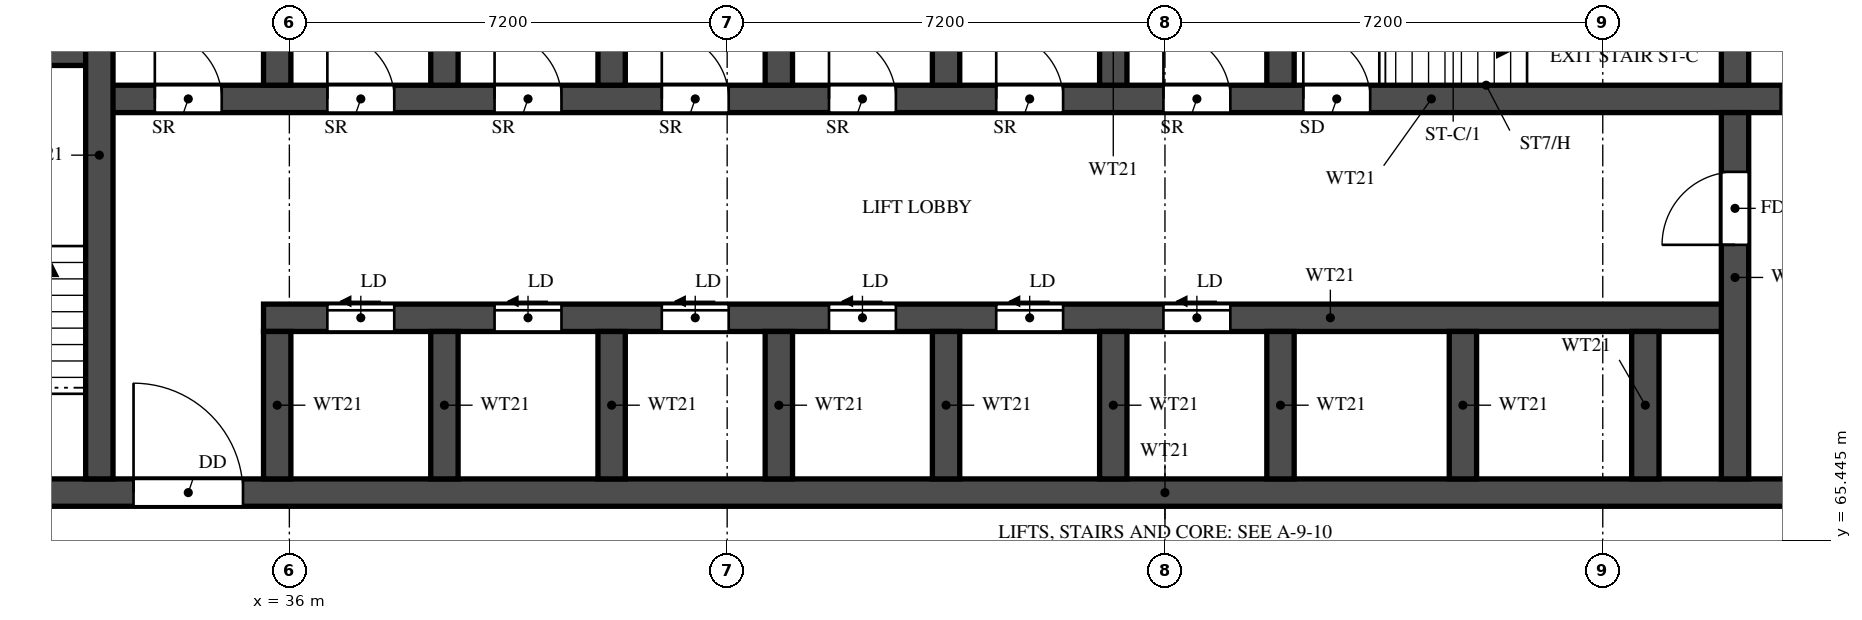
"""IFC4 building model, lengths in metres.
Left out: names, types, materials, properties, quantities, classifications, styles, units other than length and angle.
Written with IfcOpenShell. Run it as: python <this file> out.ifc"""

import sys

from ifc_helpers import new_model, si_unit, direction, frame, frame_2d, origin, place, context, subcontext, project, spatial, rectangle, extrude, element, fill, save


model = new_model("IFC4")
c1 = context("Model", 3, precision=1e-05, world=origin(), true_north=direction((0.0, 1.0)))
c2 = subcontext(c1, "Body", "Model", "MODEL_VIEW")
j1 = project(units=[si_unit("LENGTHUNIT", "METRE"), si_unit("PLANEANGLEUNIT", "RADIAN")], contexts=[c1])
p1 = place(None, origin())
s1 = spatial("IfcSite", under=j1, at=p1, CompositionType="ELEMENT")
p2 = place(p1, origin())
s2 = spatial("IfcBuilding", under=s1, at=p2, CompositionType="ELEMENT")
p3 = place(p2, frame((0.0, 0.0, 58.5)))
s3 = spatial("IfcBuildingStorey", under=s2, at=p3, CompositionType="ELEMENT", Elevation=58.5)
p4 = place(p3, frame((29.7, 66.225, 0.0), z_axis=(0.0, 0.0, 1.0), x_axis=(1.0, 0.0, 0.0)))
e1 = element("IfcWall", 1, at=p4, inside=s3, PredefinedType="SHEAR", context=c2, shape_type="SweptSolid", body=[
    extrude(rectangle(XDim=41.4, YDim=0.45, at=frame_2d((20.7, 0.0))), origin(), (0.0, 0.0, 1.0), 3.18),
])
p5 = place(p4, frame((0.925, 0.0, 0.0)))
e2 = element("IfcOpeningElement", 2, at=p5, cuts=e1, PredefinedType="OPENING", context=c2, shape_type="SweptSolid", body=[
    extrude(rectangle(XDim=1.1, YDim=2.1, at=frame_2d((0.55, 1.05))), frame((0.0, 0.235, 0.0), z_axis=(0.0, -1.0, 0.0), x_axis=(1.0, 0.0, 0.0)), (0.0, 0.0, 1.0), 0.47),
])
p6 = place(p4, frame((3.738, 0.0, 0.0)))
e3 = element("IfcOpeningElement", 3, at=p6, cuts=e1, PredefinedType="OPENING", context=c2, shape_type="SweptSolid", body=[
    extrude(rectangle(XDim=1.8, YDim=2.1, at=frame_2d((0.9, 1.05))), frame((0.0, 0.235, 0.0), z_axis=(0.0, -1.0, 0.0), x_axis=(1.0, 0.0, 0.0)), (0.0, 0.0, 1.0), 0.47),
])
p7 = place(p3, frame((35.575, 69.1, 0.0), z_axis=(0.0, 0.0, 1.0), x_axis=(1.0, 0.0, 0.0)))
e4 = element("IfcWall", 4, at=p7, inside=s3, PredefinedType="SHEAR", context=c2, shape_type="SweptSolid", body=[
    extrude(rectangle(XDim=24.2, YDim=0.45, at=frame_2d((12.1, 0.0))), origin(), (0.0, 0.0, 1.0), 3.18),
])
p8 = place(p7, frame((1.05, 0.0, 0.0)))
e5 = element("IfcOpeningElement", 5, at=p8, cuts=e4, PredefinedType="OPENING", context=c2, shape_type="SweptSolid", body=[
    extrude(rectangle(XDim=1.1, YDim=2.1, at=frame_2d((0.55, 1.05))), frame((0.0, 0.235, 0.0), z_axis=(0.0, -1.0, 0.0), x_axis=(1.0, 0.0, 0.0)), (0.0, 0.0, 1.0), 0.47),
])
p9 = place(p7, frame((3.8, 0.0, 0.0)))
e6 = element("IfcOpeningElement", 6, at=p9, cuts=e4, PredefinedType="OPENING", context=c2, shape_type="SweptSolid", body=[
    extrude(rectangle(XDim=1.1, YDim=2.1, at=frame_2d((0.55, 1.05))), frame((0.0, 0.235, 0.0), z_axis=(0.0, -1.0, 0.0), x_axis=(1.0, 0.0, 0.0)), (0.0, 0.0, 1.0), 0.47),
])
p10 = place(p7, frame((6.55, 0.0, 0.0)))
e7 = element("IfcOpeningElement", 7, at=p10, cuts=e4, PredefinedType="OPENING", context=c2, shape_type="SweptSolid", body=[
    extrude(rectangle(XDim=1.1, YDim=2.1, at=frame_2d((0.55, 1.05))), frame((0.0, 0.235, 0.0), z_axis=(0.0, -1.0, 0.0), x_axis=(1.0, 0.0, 0.0)), (0.0, 0.0, 1.0), 0.47),
])
p11 = place(p7, frame((9.3, 0.0, 0.0)))
e8 = element("IfcOpeningElement", 8, at=p11, cuts=e4, PredefinedType="OPENING", context=c2, shape_type="SweptSolid", body=[
    extrude(rectangle(XDim=1.1, YDim=2.1, at=frame_2d((0.55, 1.05))), frame((0.0, 0.235, 0.0), z_axis=(0.0, -1.0, 0.0), x_axis=(1.0, 0.0, 0.0)), (0.0, 0.0, 1.0), 0.47),
])
p12 = place(p7, frame((12.05, 0.0, 0.0)))
e9 = element("IfcOpeningElement", 9, at=p12, cuts=e4, PredefinedType="OPENING", context=c2, shape_type="SweptSolid", body=[
    extrude(rectangle(XDim=1.1, YDim=2.1, at=frame_2d((0.55, 1.05))), frame((0.0, 0.235, 0.0), z_axis=(0.0, -1.0, 0.0), x_axis=(1.0, 0.0, 0.0)), (0.0, 0.0, 1.0), 0.47),
])
p13 = place(p7, frame((14.8, 0.0, 0.0)))
e10 = element("IfcOpeningElement", 10, at=p13, cuts=e4, PredefinedType="OPENING", context=c2, shape_type="SweptSolid", body=[
    extrude(rectangle(XDim=1.1, YDim=2.1, at=frame_2d((0.55, 1.05))), frame((0.0, 0.235, 0.0), z_axis=(0.0, -1.0, 0.0), x_axis=(1.0, 0.0, 0.0)), (0.0, 0.0, 1.0), 0.47),
])
p14 = place(p3, frame((32.875, 72.7, 0.0), z_axis=(0.0, 0.0, 1.0), x_axis=(1.0, 0.0, 0.0)))
e11 = element("IfcWall", 11, at=p14, inside=s3, PredefinedType="SHEAR", context=c2, shape_type="SweptSolid", body=[
    extrude(rectangle(XDim=35.05, YDim=0.45, at=frame_2d((17.525, 0.0))), origin(), (0.0, 0.0, 1.0), 3.18),
])
p15 = place(p14, frame((19.8, 0.0, 0.0)))
e12 = element("IfcOpeningElement", 12, at=p15, cuts=e11, PredefinedType="OPENING", context=c2, shape_type="SweptSolid", body=[
    extrude(rectangle(XDim=1.1, YDim=2.1, at=frame_2d((0.55, 1.05))), frame((0.0, 0.235, 0.0), z_axis=(0.0, -1.0, 0.0), x_axis=(1.0, 0.0, 0.0)), (0.0, 0.0, 1.0), 0.47),
])
p16 = place(p14, frame((27.65, 0.0, 0.0)))
e13 = element("IfcOpeningElement", 13, at=p16, cuts=e11, PredefinedType="OPENING", context=c2, shape_type="SweptSolid", body=[
    extrude(rectangle(XDim=1.1, YDim=2.1, at=frame_2d((0.55, 1.05))), frame((0.0, 0.235, 0.0), z_axis=(0.0, -1.0, 0.0), x_axis=(1.0, 0.0, 0.0)), (0.0, 0.0, 1.0), 0.47),
])
p17 = place(p14, frame((30.25, 0.0, 0.0)))
e14 = element("IfcOpeningElement", 14, at=p17, cuts=e11, PredefinedType="OPENING", context=c2, shape_type="SweptSolid", body=[
    extrude(rectangle(XDim=1.1, YDim=2.1, at=frame_2d((0.55, 1.05))), frame((0.0, 0.235, 0.0), z_axis=(0.0, -1.0, 0.0), x_axis=(1.0, 0.0, 0.0)), (0.0, 0.0, 1.0), 0.47),
])
p18 = place(p14, frame((3.75, 0.0, 0.0)))
e15 = element("IfcOpeningElement", 15, at=p18, cuts=e11, PredefinedType="OPENING", context=c2, shape_type="SweptSolid", body=[
    extrude(rectangle(XDim=1.1, YDim=2.1, at=frame_2d((0.55, 1.05))), frame((0.0, 0.235, 0.0), z_axis=(0.0, -1.0, 0.0), x_axis=(1.0, 0.0, 0.0)), (0.0, 0.0, 1.0), 0.47),
])
p19 = place(p14, frame((6.5, 0.0, 0.0)))
e16 = element("IfcOpeningElement", 16, at=p19, cuts=e11, PredefinedType="OPENING", context=c2, shape_type="SweptSolid", body=[
    extrude(rectangle(XDim=1.1, YDim=2.1, at=frame_2d((0.55, 1.05))), frame((0.0, 0.235, 0.0), z_axis=(0.0, -1.0, 0.0), x_axis=(1.0, 0.0, 0.0)), (0.0, 0.0, 1.0), 0.47),
])
p20 = place(p14, frame((9.25, 0.0, 0.0)))
e17 = element("IfcOpeningElement", 17, at=p20, cuts=e11, PredefinedType="OPENING", context=c2, shape_type="SweptSolid", body=[
    extrude(rectangle(XDim=1.1, YDim=2.1, at=frame_2d((0.55, 1.05))), frame((0.0, 0.235, 0.0), z_axis=(0.0, -1.0, 0.0), x_axis=(1.0, 0.0, 0.0)), (0.0, 0.0, 1.0), 0.47),
])
p21 = place(p14, frame((12.0, 0.0, 0.0)))
e18 = element("IfcOpeningElement", 18, at=p21, cuts=e11, PredefinedType="OPENING", context=c2, shape_type="SweptSolid", body=[
    extrude(rectangle(XDim=1.1, YDim=2.1, at=frame_2d((0.55, 1.05))), frame((0.0, 0.235, 0.0), z_axis=(0.0, -1.0, 0.0), x_axis=(1.0, 0.0, 0.0)), (0.0, 0.0, 1.0), 0.47),
])
p22 = place(p14, frame((14.75, 0.0, 0.0)))
e19 = element("IfcOpeningElement", 19, at=p22, cuts=e11, PredefinedType="OPENING", context=c2, shape_type="SweptSolid", body=[
    extrude(rectangle(XDim=1.1, YDim=2.1, at=frame_2d((0.55, 1.05))), frame((0.0, 0.235, 0.0), z_axis=(0.0, -1.0, 0.0), x_axis=(1.0, 0.0, 0.0)), (0.0, 0.0, 1.0), 0.47),
])
p23 = place(p14, frame((17.5, 0.0, 0.0)))
e20 = element("IfcOpeningElement", 20, at=p23, cuts=e11, PredefinedType="OPENING", context=c2, shape_type="SweptSolid", body=[
    extrude(rectangle(XDim=1.1, YDim=2.1, at=frame_2d((0.55, 1.05))), frame((0.0, 0.235, 0.0), z_axis=(0.0, -1.0, 0.0), x_axis=(1.0, 0.0, 0.0)), (0.0, 0.0, 1.0), 0.47),
])
p24 = place(p14, frame((0.913, 0.0, 0.0)))
e21 = element("IfcOpeningElement", 21, at=p24, cuts=e11, PredefinedType="OPENING", context=c2, shape_type="SweptSolid", body=[
    extrude(rectangle(XDim=1.1, YDim=2.1, at=frame_2d((0.55, 1.05))), frame((0.0, 0.235, 0.0), z_axis=(0.0, -1.0, 0.0), x_axis=(1.0, 0.0, 0.0)), (0.0, 0.0, 1.0), 0.47),
])
p25 = place(p3, frame((29.7, 73.475, 0.0), z_axis=(0.0, 0.0, 1.0), x_axis=(1.0, 0.0, 0.0)))
e22 = element("IfcWall", 22, at=p25, inside=s3, PredefinedType="SHEAR", context=c2, shape_type="SweptSolid", body=[
    extrude(rectangle(XDim=3.175, YDim=0.45, at=frame_2d((1.587, 0.0))), origin(), (0.0, 0.0, 1.0), 3.18),
])
p26 = place(p3, frame((32.875, 66.45, 0.0), z_axis=(0.0, 0.0, 1.0), x_axis=(0.0, 1.0, 0.0)))
e23 = element("IfcWall", 23, at=p26, inside=s3, PredefinedType="SHEAR", context=c2, shape_type="SweptSolid", body=[
    extrude(rectangle(XDim=10.65, YDim=0.45, at=frame_2d((5.325, 0.0))), origin(), (0.0, 0.0, 1.0), 3.18),
])
p27 = place(p3, frame((59.775, 66.45, 0.0), z_axis=(0.0, 0.0, 1.0), x_axis=(0.0, 1.0, 0.0)))
e24 = element("IfcWall", 24, at=p27, inside=s3, PredefinedType="SHEAR", context=c2, shape_type="SweptSolid", body=[
    extrude(rectangle(XDim=6.025, YDim=0.45, at=frame_2d((3.013, 0.0))), origin(), (0.0, 0.0, 1.0), 3.18),
])
p28 = place(p27, frame((3.85, 0.0, 0.0)))
e25 = element("IfcOpeningElement", 25, at=p28, cuts=e24, PredefinedType="OPENING", context=c2, shape_type="SweptSolid", body=[
    extrude(rectangle(XDim=1.2, YDim=2.1, at=frame_2d((0.6, 1.05))), frame((0.0, 0.235, 0.0), z_axis=(0.0, -1.0, 0.0), x_axis=(1.0, 0.0, 0.0)), (0.0, 0.0, 1.0), 0.47),
])
p29 = place(p3, frame((59.775, 72.925, 0.0), z_axis=(0.0, 0.0, 1.0), x_axis=(0.0, 1.0, 0.0)))
e26 = element("IfcWall", 26, at=p29, inside=s3, PredefinedType="SHEAR", context=c2, shape_type="SweptSolid", body=[
    extrude(rectangle(XDim=2.95, YDim=0.45, at=frame_2d((1.475, 0.0))), origin(), (0.0, 0.0, 1.0), 3.18),
])
for number, where, z_axis, x_axis in (
    (27, (35.8, 66.45, 0.0), (0.0, 0.0, 1.0), (0.0, 1.0, 0.0)),
    (28, (38.55, 66.45, 0.0), (0.0, 0.0, 1.0), (0.0, 1.0, 0.0)),
    (29, (41.3, 66.45, 0.0), (0.0, 0.0, 1.0), (0.0, 1.0, 0.0)),
    (30, (44.05, 66.45, 0.0), (0.0, 0.0, 1.0), (0.0, 1.0, 0.0)),
    (31, (46.8, 66.45, 0.0), (0.0, 0.0, 1.0), (0.0, 1.0, 0.0)),
    (32, (49.55, 66.45, 0.0), (0.0, 0.0, 1.0), (0.0, 1.0, 0.0)),
    (33, (52.3, 66.45, 0.0), (0.0, 0.0, 1.0), (0.0, 1.0, 0.0)),
    (34, (55.3, 66.45, 0.0), (0.0, 0.0, 1.0), (0.0, 1.0, 0.0)),
    (35, (58.3, 66.45, 0.0), (0.0, 0.0, 1.0), (0.0, 1.0, 0.0)),
):
    element("IfcWall", number, at=place(p3, frame(where, z_axis=z_axis, x_axis=x_axis)), inside=s3, PredefinedType="SHEAR", context=c2, shape_type="SweptSolid", body=[
        extrude(rectangle(XDim=2.425, YDim=0.45, at=frame_2d((1.212, 0.0))), origin(), (0.0, 0.0, 1.0), 3.18),
    ])
for number, where, z_axis, x_axis in (
    (36, (35.8, 72.925, 0.0), (0.0, 0.0, 1.0), (0.0, 1.0, 0.0)),
    (37, (38.55, 72.925, 0.0), (0.0, 0.0, 1.0), (0.0, 1.0, 0.0)),
    (38, (41.3, 72.925, 0.0), (0.0, 0.0, 1.0), (0.0, 1.0, 0.0)),
    (39, (44.05, 72.925, 0.0), (0.0, 0.0, 1.0), (0.0, 1.0, 0.0)),
    (40, (46.8, 72.925, 0.0), (0.0, 0.0, 1.0), (0.0, 1.0, 0.0)),
    (41, (49.55, 72.925, 0.0), (0.0, 0.0, 1.0), (0.0, 1.0, 0.0)),
    (42, (52.3, 72.925, 0.0), (0.0, 0.0, 1.0), (0.0, 1.0, 0.0)),
):
    element("IfcWall", number, at=place(p3, frame(where, z_axis=z_axis, x_axis=x_axis)), inside=s3, PredefinedType="SHEAR", context=c2, shape_type="SweptSolid", body=[
        extrude(rectangle(XDim=2.95, YDim=0.45, at=frame_2d((1.475, 0.0))), origin(), (0.0, 0.0, 1.0), 3.18),
    ])
p30 = place(p15, origin())
e43 = element("IfcDoor", 43, at=p30, inside=s3, OperationType="SINGLE_SWING_LEFT", PredefinedType="DOOR", context=c2, shape_type="SweptSolid", body=[
    extrude(rectangle(XDim=1.1, YDim=2.1, at=frame_2d((0.55, 1.05))), frame((0.0, 0.025, 0.0), z_axis=(0.0, -1.0, 0.0), x_axis=(1.0, 0.0, 0.0)), (0.0, 0.0, 1.0), 0.05),
])
fill(e12, e43)
p31 = place(p6, origin())
e44 = element("IfcDoor", 44, at=p31, inside=s3, OperationType="DOUBLE_DOOR_SINGLE_SWING", PredefinedType="DOOR", context=c2, shape_type="SweptSolid", body=[
    extrude(rectangle(XDim=1.8, YDim=2.1, at=frame_2d((0.9, 1.05))), frame((0.0, 0.025, 0.0), z_axis=(0.0, -1.0, 0.0), x_axis=(1.0, 0.0, 0.0)), (0.0, 0.0, 1.0), 0.05),
])
fill(e3, e44)
p32 = place(p28, origin())
e45 = element("IfcDoor", 45, at=p32, inside=s3, OperationType="SINGLE_SWING_RIGHT", PredefinedType="DOOR", context=c2, shape_type="SweptSolid", body=[
    extrude(rectangle(XDim=1.2, YDim=2.1, at=frame_2d((0.6, 1.05))), frame((0.0, 0.025, 0.0), z_axis=(0.0, -1.0, 0.0), x_axis=(1.0, 0.0, 0.0)), (0.0, 0.0, 1.0), 0.05),
])
fill(e25, e45)
p33 = place(p16, origin())
e46 = element("IfcDoor", 46, at=p33, inside=s3, OperationType="SLIDING_TO_LEFT", PredefinedType="DOOR", context=c2, shape_type="SweptSolid", body=[
    extrude(rectangle(XDim=1.1, YDim=2.1, at=frame_2d((0.55, 1.05))), frame((0.0, 0.025, 0.0), z_axis=(0.0, -1.0, 0.0), x_axis=(1.0, 0.0, 0.0)), (0.0, 0.0, 1.0), 0.05),
])
fill(e13, e46)
p34 = place(p8, origin())
e47 = element("IfcDoor", 47, at=p34, inside=s3, OperationType="SLIDING_TO_LEFT", PredefinedType="DOOR", context=c2, shape_type="SweptSolid", body=[
    extrude(rectangle(XDim=1.1, YDim=2.1, at=frame_2d((0.55, 1.05))), frame((0.0, 0.025, 0.0), z_axis=(0.0, -1.0, 0.0), x_axis=(1.0, 0.0, 0.0)), (0.0, 0.0, 1.0), 0.05),
])
fill(e5, e47)
p35 = place(p9, origin())
e48 = element("IfcDoor", 48, at=p35, inside=s3, OperationType="SLIDING_TO_LEFT", PredefinedType="DOOR", context=c2, shape_type="SweptSolid", body=[
    extrude(rectangle(XDim=1.1, YDim=2.1, at=frame_2d((0.55, 1.05))), frame((0.0, 0.025, 0.0), z_axis=(0.0, -1.0, 0.0), x_axis=(1.0, 0.0, 0.0)), (0.0, 0.0, 1.0), 0.05),
])
fill(e6, e48)
p36 = place(p10, origin())
e49 = element("IfcDoor", 49, at=p36, inside=s3, OperationType="SLIDING_TO_LEFT", PredefinedType="DOOR", context=c2, shape_type="SweptSolid", body=[
    extrude(rectangle(XDim=1.1, YDim=2.1, at=frame_2d((0.55, 1.05))), frame((0.0, 0.025, 0.0), z_axis=(0.0, -1.0, 0.0), x_axis=(1.0, 0.0, 0.0)), (0.0, 0.0, 1.0), 0.05),
])
fill(e7, e49)
p37 = place(p11, origin())
e50 = element("IfcDoor", 50, at=p37, inside=s3, OperationType="SLIDING_TO_LEFT", PredefinedType="DOOR", context=c2, shape_type="SweptSolid", body=[
    extrude(rectangle(XDim=1.1, YDim=2.1, at=frame_2d((0.55, 1.05))), frame((0.0, 0.025, 0.0), z_axis=(0.0, -1.0, 0.0), x_axis=(1.0, 0.0, 0.0)), (0.0, 0.0, 1.0), 0.05),
])
fill(e8, e50)
p38 = place(p12, origin())
e51 = element("IfcDoor", 51, at=p38, inside=s3, OperationType="SLIDING_TO_LEFT", PredefinedType="DOOR", context=c2, shape_type="SweptSolid", body=[
    extrude(rectangle(XDim=1.1, YDim=2.1, at=frame_2d((0.55, 1.05))), frame((0.0, 0.025, 0.0), z_axis=(0.0, -1.0, 0.0), x_axis=(1.0, 0.0, 0.0)), (0.0, 0.0, 1.0), 0.05),
])
fill(e9, e51)
p39 = place(p13, origin())
e52 = element("IfcDoor", 52, at=p39, inside=s3, OperationType="SLIDING_TO_LEFT", PredefinedType="DOOR", context=c2, shape_type="SweptSolid", body=[
    extrude(rectangle(XDim=1.1, YDim=2.1, at=frame_2d((0.55, 1.05))), frame((0.0, 0.025, 0.0), z_axis=(0.0, -1.0, 0.0), x_axis=(1.0, 0.0, 0.0)), (0.0, 0.0, 1.0), 0.05),
])
fill(e10, e52)
p40 = place(p18, origin())
e53 = element("IfcDoor", 53, at=p40, inside=s3, OperationType="SINGLE_SWING_LEFT", PredefinedType="DOOR", context=c2, shape_type="SweptSolid", body=[
    extrude(rectangle(XDim=1.1, YDim=2.1, at=frame_2d((0.55, 1.05))), frame((0.0, 0.025, 0.0), z_axis=(0.0, -1.0, 0.0), x_axis=(1.0, 0.0, 0.0)), (0.0, 0.0, 1.0), 0.05),
])
fill(e15, e53)
p41 = place(p19, origin())
e54 = element("IfcDoor", 54, at=p41, inside=s3, OperationType="SINGLE_SWING_LEFT", PredefinedType="DOOR", context=c2, shape_type="SweptSolid", body=[
    extrude(rectangle(XDim=1.1, YDim=2.1, at=frame_2d((0.55, 1.05))), frame((0.0, 0.025, 0.0), z_axis=(0.0, -1.0, 0.0), x_axis=(1.0, 0.0, 0.0)), (0.0, 0.0, 1.0), 0.05),
])
fill(e16, e54)
p42 = place(p20, origin())
e55 = element("IfcDoor", 55, at=p42, inside=s3, OperationType="SINGLE_SWING_LEFT", PredefinedType="DOOR", context=c2, shape_type="SweptSolid", body=[
    extrude(rectangle(XDim=1.1, YDim=2.1, at=frame_2d((0.55, 1.05))), frame((0.0, 0.025, 0.0), z_axis=(0.0, -1.0, 0.0), x_axis=(1.0, 0.0, 0.0)), (0.0, 0.0, 1.0), 0.05),
])
fill(e17, e55)
p43 = place(p21, origin())
e56 = element("IfcDoor", 56, at=p43, inside=s3, OperationType="SINGLE_SWING_LEFT", PredefinedType="DOOR", context=c2, shape_type="SweptSolid", body=[
    extrude(rectangle(XDim=1.1, YDim=2.1, at=frame_2d((0.55, 1.05))), frame((0.0, 0.025, 0.0), z_axis=(0.0, -1.0, 0.0), x_axis=(1.0, 0.0, 0.0)), (0.0, 0.0, 1.0), 0.05),
])
fill(e18, e56)
p44 = place(p22, origin())
e57 = element("IfcDoor", 57, at=p44, inside=s3, OperationType="SINGLE_SWING_LEFT", PredefinedType="DOOR", context=c2, shape_type="SweptSolid", body=[
    extrude(rectangle(XDim=1.1, YDim=2.1, at=frame_2d((0.55, 1.05))), frame((0.0, 0.025, 0.0), z_axis=(0.0, -1.0, 0.0), x_axis=(1.0, 0.0, 0.0)), (0.0, 0.0, 1.0), 0.05),
])
fill(e19, e57)
p45 = place(p23, origin())
e58 = element("IfcDoor", 58, at=p45, inside=s3, OperationType="SINGLE_SWING_LEFT", PredefinedType="DOOR", context=c2, shape_type="SweptSolid", body=[
    extrude(rectangle(XDim=1.1, YDim=2.1, at=frame_2d((0.55, 1.05))), frame((0.0, 0.025, 0.0), z_axis=(0.0, -1.0, 0.0), x_axis=(1.0, 0.0, 0.0)), (0.0, 0.0, 1.0), 0.05),
])
fill(e20, e58)
p46 = place(p24, origin())
e59 = element("IfcDoor", 59, at=p46, inside=s3, OperationType="SINGLE_SWING_LEFT", PredefinedType="DOOR", context=c2, shape_type="SweptSolid", body=[
    extrude(rectangle(XDim=1.1, YDim=2.1, at=frame_2d((0.55, 1.05))), frame((0.0, 0.025, 0.0), z_axis=(0.0, -1.0, 0.0), x_axis=(1.0, 0.0, 0.0)), (0.0, 0.0, 1.0), 0.05),
])
fill(e21, e59)
save(model, sys.argv[1])
